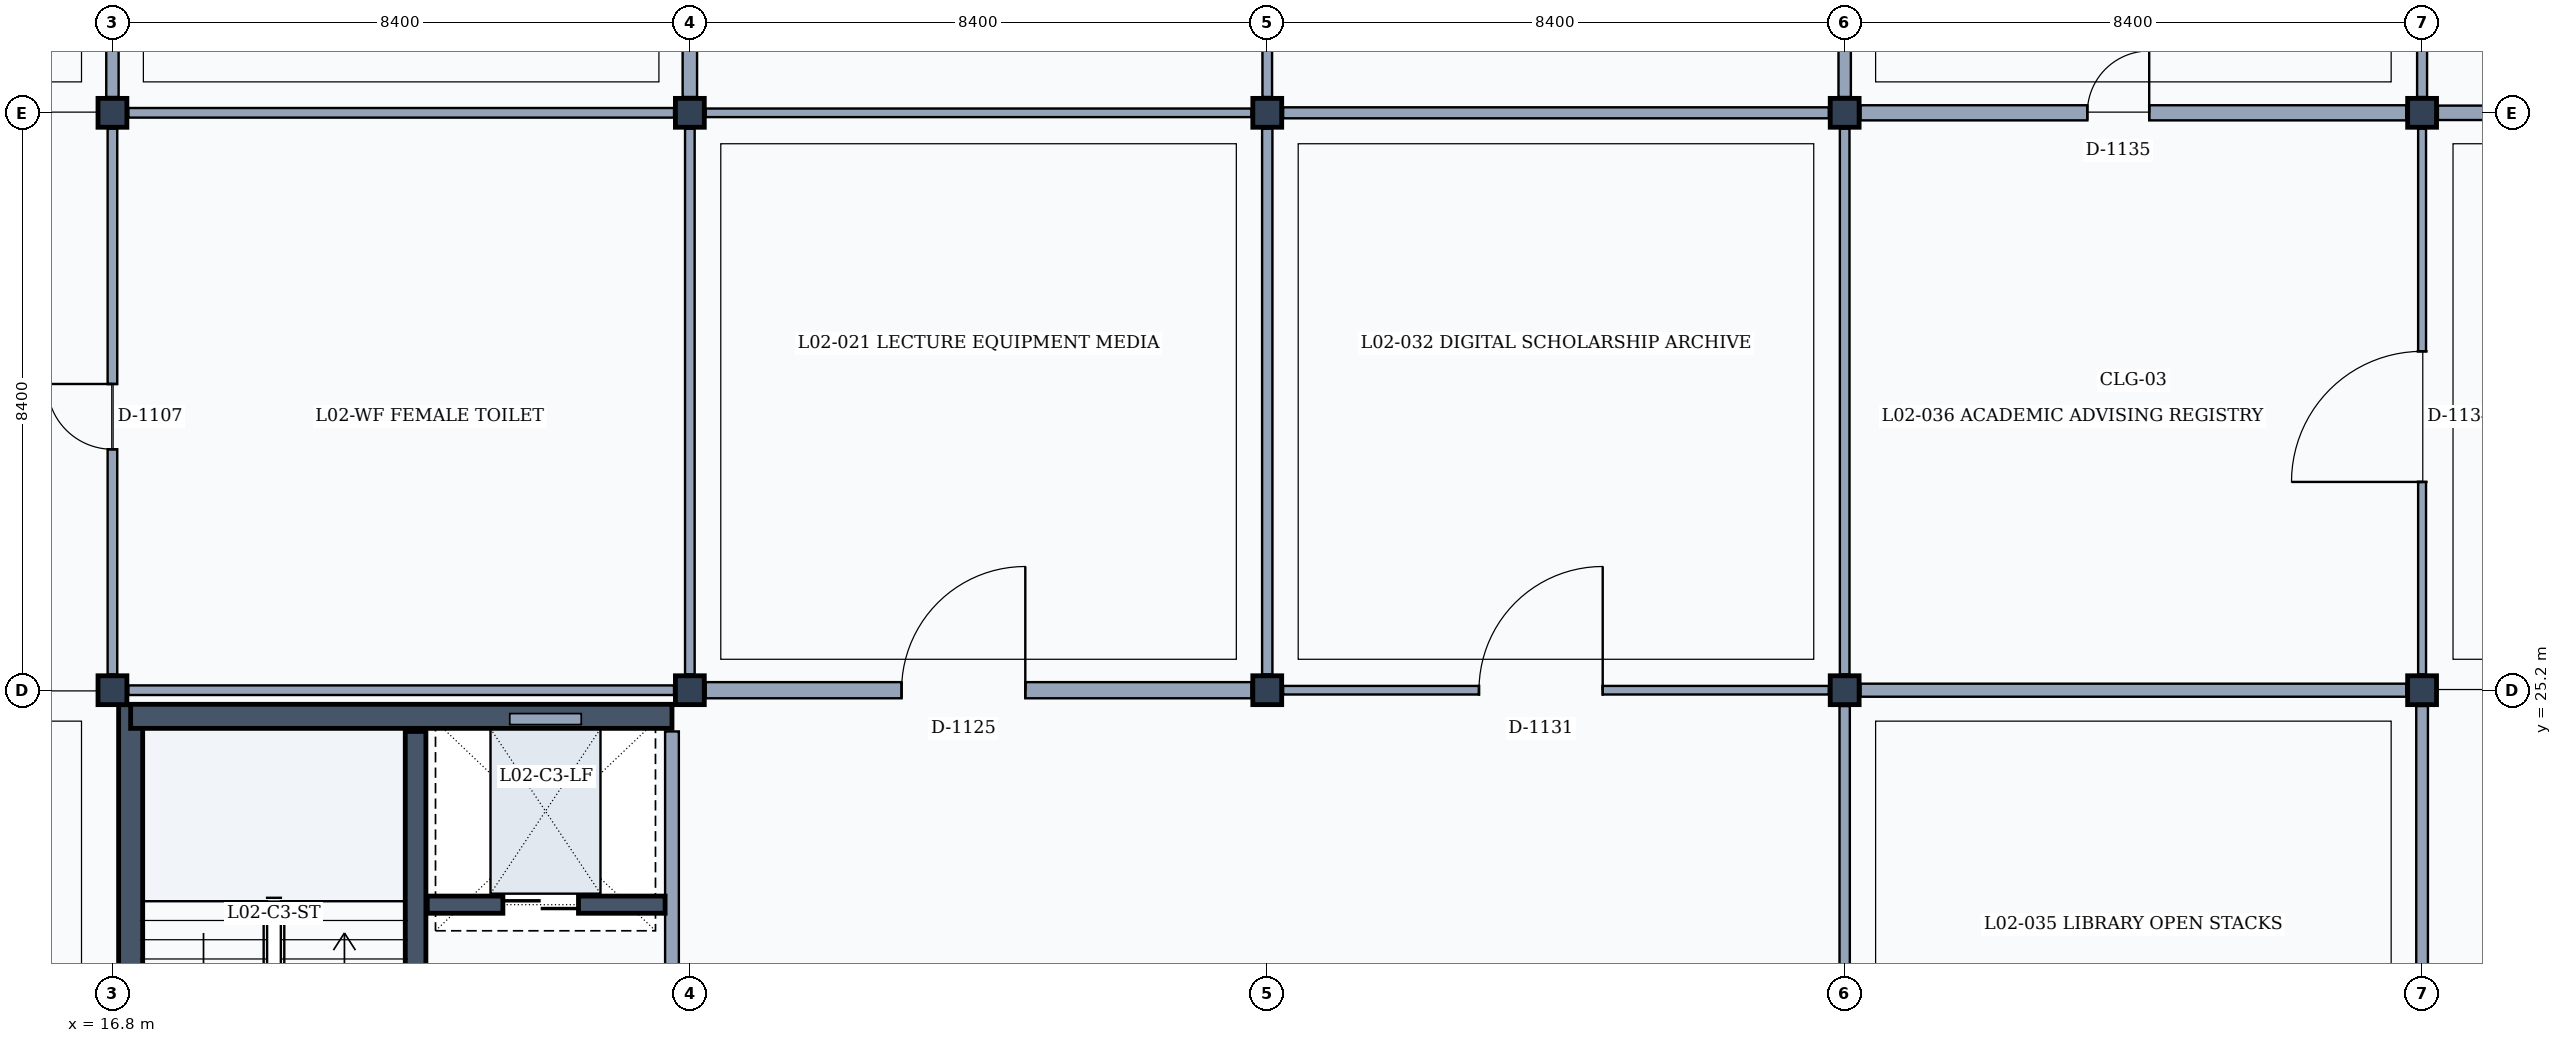
"""IFC4 building model, lengths in metres.
Left out: names, types, materials, properties, quantities, classifications, styles, units other than length and angle.
Written with IfcOpenShell. Run it as: python <this file> out.ifc"""

import sys

from ifc_helpers import new_model, si_unit, direction, frame, frame_2d, origin, origin_2d, place, context, subcontext, project, spatial, rectangle, extrude, element, fill, save


model = new_model("IFC4")
c1 = context("Model", 3, precision=1e-05, world=origin(), true_north=direction((0.0, 1.0)))
c2 = subcontext(c1, "Body", "Model", "MODEL_VIEW")
j1 = project(units=[si_unit("LENGTHUNIT", "METRE"), si_unit("PLANEANGLEUNIT", "RADIAN")], contexts=[c1])
p1 = place(None, origin())
s1 = spatial("IfcSite", under=j1, at=p1, CompositionType="ELEMENT")
p2 = place(p1, origin())
s2 = spatial("IfcBuilding", under=s1, at=p2, CompositionType="ELEMENT")
p3 = place(p2, frame((0.0, 0.0, 9.6)))
s3 = spatial("IfcBuildingStorey", under=s2, at=p3, CompositionType="ELEMENT", Elevation=9.6)
for number, where, z_axis, x_axis in (
    (1, (16.8, 25.2, 0.0), (0.0, 0.0, 1.0), (1.0, 0.0, 0.0)),
    (2, (16.8, 33.6, 0.0), (0.0, 0.0, 1.0), (1.0, 0.0, 0.0)),
    (3, (25.2, 25.2, 0.0), (0.0, 0.0, 1.0), (1.0, 0.0, 0.0)),
    (4, (25.2, 33.6, 0.0), (0.0, 0.0, 1.0), (1.0, 0.0, 0.0)),
    (5, (33.6, 25.2, 0.0), (0.0, 0.0, 1.0), (1.0, 0.0, 0.0)),
    (6, (33.6, 33.6, 0.0), (0.0, 0.0, 1.0), (1.0, 0.0, 0.0)),
    (7, (42.0, 25.2, 0.0), (0.0, 0.0, 1.0), (1.0, 0.0, 0.0)),
    (8, (42.0, 33.6, 0.0), (0.0, 0.0, 1.0), (1.0, 0.0, 0.0)),
    (9, (50.4, 25.2, 0.0), (0.0, 0.0, 1.0), (1.0, 0.0, 0.0)),
    (10, (50.4, 33.6, 0.0), (0.0, 0.0, 1.0), (1.0, 0.0, 0.0)),
):
    element("IfcColumn", number, at=place(p3, frame(where, z_axis=z_axis, x_axis=x_axis)), inside=s3, PredefinedType="COLUMN", context=c2, shape_type="SweptSolid", body=[
        extrude(rectangle(XDim=0.42, YDim=0.42, at=origin_2d()), origin(), (0.0, 0.0, 1.0), 4.2),
    ])
p4 = place(p3, frame((17.065, 17.05, 0.0), z_axis=(0.0, 0.0, 1.0), x_axis=(0.0, 1.0, 0.0)))
e11 = element("IfcWall", 11, at=p4, inside=s3, PredefinedType="SHEAR", context=c2, shape_type="SweptSolid", body=[
    extrude(rectangle(XDim=7.94, YDim=0.35, at=frame_2d((3.97, 0.0))), origin(), (0.0, 0.0, 1.0), 3.93),
])
p5 = place(p3, frame((17.065, 24.82, 0.0), z_axis=(0.0, 0.0, 1.0), x_axis=(1.0, 0.0, 0.0)))
e12 = element("IfcWall", 12, at=p5, inside=s3, PredefinedType="SHEAR", context=c2, shape_type="SweptSolid", body=[
    extrude(rectangle(XDim=7.875, YDim=0.35, at=frame_2d((3.938, 0.0))), origin(), (0.0, 0.0, 1.0), 3.93),
])
p6 = place(p3, frame((24.94, 24.6, 0.0), z_axis=(0.0, 0.0, 1.0), x_axis=(0.0, -1.0, 0.0)))
e13 = element("IfcWall", 13, at=p6, inside=s3, PredefinedType="PARTITIONING", context=c2, shape_type="SweptSolid", body=[
    extrude(rectangle(XDim=7.2, YDim=0.2, at=frame_2d((3.6, 0.0))), origin(), (0.0, 0.0, 1.0), 3.32),
])
p7 = place(p3, frame((21.21, 17.22, 0.0), z_axis=(0.0, 0.0, 1.0), x_axis=(0.0, 1.0, 0.0)))
e14 = element("IfcWall", 14, at=p7, inside=s3, PredefinedType="SHEAR", context=c2, shape_type="SweptSolid", body=[
    extrude(rectangle(XDim=7.38, YDim=0.3, at=frame_2d((3.69, 0.0))), origin(), (0.0, 0.0, 1.0), 3.93),
])
p8 = place(p7, frame((0.28, 0.0, 0.0)))
e15 = element("IfcOpeningElement", 15, at=p8, cuts=e14, PredefinedType="OPENING", context=c2, shape_type="SweptSolid", body=[
    extrude(rectangle(XDim=1.1, YDim=2.15, at=frame_2d((0.55, 1.075))), frame((0.0, 0.16, 0.0), z_axis=(0.0, -1.0, 0.0), x_axis=(1.0, 0.0, 0.0)), (0.0, 0.0, 1.0), 0.32),
])
p9 = place(p3, frame((21.38, 22.08, 0.0), z_axis=(0.0, 0.0, 1.0), x_axis=(1.0, 0.0, 0.0)))
e16 = element("IfcWall", 16, at=p9, inside=s3, PredefinedType="SHEAR", context=c2, shape_type="SweptSolid", body=[
    extrude(rectangle(XDim=3.46, YDim=0.25, at=frame_2d((1.73, 0.0))), origin(), (0.0, 0.0, 1.0), 3.93),
])
p10 = place(p9, frame((1.1, 0.0, 0.0)))
e17 = element("IfcOpeningElement", 17, at=p10, cuts=e16, PredefinedType="OPENING", context=c2, shape_type="SweptSolid", body=[
    extrude(rectangle(XDim=1.1, YDim=2.15, at=frame_2d((0.55, 1.075))), frame((0.0, 0.135, 0.0), z_axis=(0.0, -1.0, 0.0), x_axis=(1.0, 0.0, 0.0)), (0.0, 0.0, 1.0), 0.27),
])
p11 = place(p3, frame((16.8, 25.43, 0.0), z_axis=(0.0, 0.0, 1.0), x_axis=(0.0, 1.0, 0.0)))
e18 = element("IfcWall", 18, at=p11, inside=s3, PredefinedType="PARTITIONING", context=c2, shape_type="SweptSolid", body=[
    extrude(rectangle(XDim=7.94, YDim=0.14, at=frame_2d((3.97, 0.0))), origin(), (0.0, 0.0, 1.0), 3.32),
])
p12 = place(p11, frame((3.275, 0.0, 0.0)))
e19 = element("IfcOpeningElement", 19, at=p12, cuts=e18, PredefinedType="OPENING", context=c2, shape_type="SweptSolid", body=[
    extrude(rectangle(XDim=0.95, YDim=2.15, at=frame_2d((0.475, 1.075))), frame((0.0, 0.08, 0.0), z_axis=(0.0, -1.0, 0.0), x_axis=(1.0, 0.0, 0.0)), (0.0, 0.0, 1.0), 0.16),
])
p13 = place(p3, frame((16.8, 33.83, 0.0), z_axis=(0.0, 0.0, 1.0), x_axis=(0.0, 1.0, 0.0)))
e20 = element("IfcWall", 20, at=p13, inside=s3, PredefinedType="PARTITIONING", context=c2, shape_type="SweptSolid", body=[
    extrude(rectangle(XDim=7.96, YDim=0.18, at=frame_2d((3.98, 0.0))), origin(), (0.0, 0.0, 1.0), 3.32),
])
p14 = place(p13, frame((3.15, 0.0, 0.0)))
e21 = element("IfcOpeningElement", 21, at=p14, cuts=e20, PredefinedType="OPENING", context=c2, shape_type="SweptSolid", body=[
    extrude(rectangle(XDim=1.2, YDim=2.2, at=frame_2d((0.6, 1.1))), frame((0.0, 0.1, 0.0), z_axis=(0.0, -1.0, 0.0), x_axis=(1.0, 0.0, 0.0)), (0.0, 0.0, 1.0), 0.2),
])
p15 = place(p3, frame((17.03, 25.2, 0.0), z_axis=(0.0, 0.0, 1.0), x_axis=(1.0, 0.0, 0.0)))
e22 = element("IfcWall", 22, at=p15, inside=s3, PredefinedType="PARTITIONING", context=c2, shape_type="SweptSolid", body=[
    extrude(rectangle(XDim=7.94, YDim=0.14, at=frame_2d((3.97, 0.0))), origin(), (0.0, 0.0, 1.0), 3.32),
])
p16 = place(p3, frame((25.2, 25.43, 0.0), z_axis=(0.0, 0.0, 1.0), x_axis=(0.0, 1.0, 0.0)))
e23 = element("IfcWall", 23, at=p16, inside=s3, PredefinedType="PARTITIONING", context=c2, shape_type="SweptSolid", body=[
    extrude(rectangle(XDim=7.94, YDim=0.14, at=frame_2d((3.97, 0.0))), origin(), (0.0, 0.0, 1.0), 3.32),
])
p17 = place(p3, frame((17.03, 33.6, 0.0), z_axis=(0.0, 0.0, 1.0), x_axis=(1.0, 0.0, 0.0)))
e24 = element("IfcWall", 24, at=p17, inside=s3, PredefinedType="PARTITIONING", context=c2, shape_type="SweptSolid", body=[
    extrude(rectangle(XDim=7.94, YDim=0.14, at=frame_2d((3.97, 0.0))), origin(), (0.0, 0.0, 1.0), 3.32),
])
p18 = place(p3, frame((25.2, 33.83, 0.0), z_axis=(0.0, 0.0, 1.0), x_axis=(0.0, 1.0, 0.0)))
e25 = element("IfcWall", 25, at=p18, inside=s3, PredefinedType="PARTITIONING", context=c2, shape_type="SweptSolid", body=[
    extrude(rectangle(XDim=7.95, YDim=0.21, at=frame_2d((3.975, 0.0))), origin(), (0.0, 0.0, 1.0), 3.32),
])
p19 = place(p18, frame((3.175, 0.0, 0.0)))
e26 = element("IfcOpeningElement", 26, at=p19, cuts=e25, PredefinedType="OPENING", context=c2, shape_type="SweptSolid", body=[
    extrude(rectangle(XDim=1.15, YDim=2.25, at=frame_2d((0.575, 1.125))), frame((0.0, 0.115, 0.0), z_axis=(0.0, -1.0, 0.0), x_axis=(1.0, 0.0, 0.0)), (0.0, 0.0, 1.0), 0.23),
])
p20 = place(p3, frame((25.43, 25.2, 0.0), z_axis=(0.0, 0.0, 1.0), x_axis=(1.0, 0.0, 0.0)))
e27 = element("IfcWall", 27, at=p20, inside=s3, PredefinedType="PARTITIONING", context=c2, shape_type="SweptSolid", body=[
    extrude(rectangle(XDim=7.94, YDim=0.235, at=frame_2d((3.97, 0.0))), origin(), (0.0, 0.0, 1.0), 3.32),
])
p21 = place(p20, frame((2.85, 0.0, 0.0)))
e28 = element("IfcOpeningElement", 28, at=p21, cuts=e27, PredefinedType="OPENING", context=c2, shape_type="SweptSolid", body=[
    extrude(rectangle(XDim=1.8, YDim=2.3, at=frame_2d((0.9, 1.15))), frame((0.0, 0.127, 0.0), z_axis=(0.0, -1.0, 0.0), x_axis=(1.0, 0.0, 0.0)), (0.0, 0.0, 1.0), 0.255),
])
p22 = place(p3, frame((33.6, 25.43, 0.0), z_axis=(0.0, 0.0, 1.0), x_axis=(0.0, 1.0, 0.0)))
e29 = element("IfcWall", 29, at=p22, inside=s3, PredefinedType="PARTITIONING", context=c2, shape_type="SweptSolid", body=[
    extrude(rectangle(XDim=7.94, YDim=0.15, at=frame_2d((3.97, 0.0))), origin(), (0.0, 0.0, 1.0), 3.32),
])
p23 = place(p3, frame((25.43, 33.6, 0.0), z_axis=(0.0, 0.0, 1.0), x_axis=(1.0, 0.0, 0.0)))
e30 = element("IfcWall", 30, at=p23, inside=s3, PredefinedType="PARTITIONING", context=c2, shape_type="SweptSolid", body=[
    extrude(rectangle(XDim=7.94, YDim=0.125, at=frame_2d((3.97, 0.0))), origin(), (0.0, 0.0, 1.0), 3.32),
])
p24 = place(p3, frame((33.6, 33.83, 0.0), z_axis=(0.0, 0.0, 1.0), x_axis=(0.0, 1.0, 0.0)))
e31 = element("IfcWall", 31, at=p24, inside=s3, PredefinedType="PARTITIONING", context=c2, shape_type="SweptSolid", body=[
    extrude(rectangle(XDim=7.96, YDim=0.14, at=frame_2d((3.98, 0.0))), origin(), (0.0, 0.0, 1.0), 3.32),
])
p25 = place(p24, frame((3.05, 0.0, 0.0)))
e32 = element("IfcOpeningElement", 32, at=p25, cuts=e31, PredefinedType="OPENING", context=c2, shape_type="SweptSolid", body=[
    extrude(rectangle(XDim=1.4, YDim=2.25, at=frame_2d((0.7, 1.125))), frame((0.0, 0.08, 0.0), z_axis=(0.0, -1.0, 0.0), x_axis=(1.0, 0.0, 0.0)), (0.0, 0.0, 1.0), 0.16),
])
p26 = place(p3, frame((42.0, 17.03, 0.0), z_axis=(0.0, 0.0, 1.0), x_axis=(0.0, 1.0, 0.0)))
e33 = element("IfcWall", 33, at=p26, inside=s3, PredefinedType="PARTITIONING", context=c2, shape_type="SweptSolid", body=[
    extrude(rectangle(XDim=7.94, YDim=0.15, at=frame_2d((3.97, 0.0))), origin(), (0.0, 0.0, 1.0), 3.32),
])
p27 = place(p3, frame((33.83, 25.2, 0.0), z_axis=(0.0, 0.0, 1.0), x_axis=(1.0, 0.0, 0.0)))
e34 = element("IfcWall", 34, at=p27, inside=s3, PredefinedType="PARTITIONING", context=c2, shape_type="SweptSolid", body=[
    extrude(rectangle(XDim=7.94, YDim=0.125, at=frame_2d((3.97, 0.0))), origin(), (0.0, 0.0, 1.0), 3.32),
])
p28 = place(p27, frame((2.85, 0.0, 0.0)))
e35 = element("IfcOpeningElement", 35, at=p28, cuts=e34, PredefinedType="OPENING", context=c2, shape_type="SweptSolid", body=[
    extrude(rectangle(XDim=1.8, YDim=2.3, at=frame_2d((0.9, 1.15))), frame((0.0, 0.073, 0.0), z_axis=(0.0, -1.0, 0.0), x_axis=(1.0, 0.0, 0.0)), (0.0, 0.0, 1.0), 0.145),
])
p29 = place(p3, frame((42.0, 25.43, 0.0), z_axis=(0.0, 0.0, 1.0), x_axis=(0.0, 1.0, 0.0)))
e36 = element("IfcWall", 36, at=p29, inside=s3, PredefinedType="PARTITIONING", context=c2, shape_type="SweptSolid", body=[
    extrude(rectangle(XDim=7.94, YDim=0.14, at=frame_2d((3.97, 0.0))), origin(), (0.0, 0.0, 1.0), 3.32),
])
p30 = place(p3, frame((33.83, 33.6, 0.0), z_axis=(0.0, 0.0, 1.0), x_axis=(1.0, 0.0, 0.0)))
e37 = element("IfcWall", 37, at=p30, inside=s3, PredefinedType="PARTITIONING", context=c2, shape_type="SweptSolid", body=[
    extrude(rectangle(XDim=7.94, YDim=0.16, at=frame_2d((3.97, 0.0))), origin(), (0.0, 0.0, 1.0), 3.32),
])
p31 = place(p3, frame((42.0, 33.83, 0.0), z_axis=(0.0, 0.0, 1.0), x_axis=(0.0, 1.0, 0.0)))
e38 = element("IfcWall", 38, at=p31, inside=s3, PredefinedType="PARTITIONING", context=c2, shape_type="SweptSolid", body=[
    extrude(rectangle(XDim=7.95, YDim=0.18, at=frame_2d((3.975, 0.0))), origin(), (0.0, 0.0, 1.0), 3.32),
])
p32 = place(p3, frame((50.4, 17.03, 0.0), z_axis=(0.0, 0.0, 1.0), x_axis=(0.0, 1.0, 0.0)))
e39 = element("IfcWall", 39, at=p32, inside=s3, PredefinedType="PARTITIONING", context=c2, shape_type="SweptSolid", body=[
    extrude(rectangle(XDim=7.94, YDim=0.17, at=frame_2d((3.97, 0.0))), origin(), (0.0, 0.0, 1.0), 3.32),
])
p33 = place(p3, frame((42.23, 25.2, 0.0), z_axis=(0.0, 0.0, 1.0), x_axis=(1.0, 0.0, 0.0)))
e40 = element("IfcWall", 40, at=p33, inside=s3, PredefinedType="PARTITIONING", context=c2, shape_type="SweptSolid", body=[
    extrude(rectangle(XDim=7.94, YDim=0.19, at=frame_2d((3.97, 0.0))), origin(), (0.0, 0.0, 1.0), 3.32),
])
p34 = place(p3, frame((50.4, 25.43, 0.0), z_axis=(0.0, 0.0, 1.0), x_axis=(0.0, 1.0, 0.0)))
e41 = element("IfcWall", 41, at=p34, inside=s3, PredefinedType="PARTITIONING", context=c2, shape_type="SweptSolid", body=[
    extrude(rectangle(XDim=7.94, YDim=0.115, at=frame_2d((3.97, 0.0))), origin(), (0.0, 0.0, 1.0), 3.32),
])
p35 = place(p34, frame((2.8, 0.0, 0.0)))
e42 = element("IfcOpeningElement", 42, at=p35, cuts=e41, PredefinedType="OPENING", context=c2, shape_type="SweptSolid", body=[
    extrude(rectangle(XDim=1.9, YDim=2.4, at=frame_2d((0.95, 1.2))), frame((0.0, 0.067, 0.0), z_axis=(0.0, -1.0, 0.0), x_axis=(1.0, 0.0, 0.0)), (0.0, 0.0, 1.0), 0.135),
])
p36 = place(p3, frame((42.23, 33.6, 0.0), z_axis=(0.0, 0.0, 1.0), x_axis=(1.0, 0.0, 0.0)))
e43 = element("IfcWall", 43, at=p36, inside=s3, PredefinedType="PARTITIONING", context=c2, shape_type="SweptSolid", body=[
    extrude(rectangle(XDim=7.94, YDim=0.22, at=frame_2d((3.97, 0.0))), origin(), (0.0, 0.0, 1.0), 3.32),
])
p37 = place(p36, frame((3.3, 0.0, 0.0)))
e44 = element("IfcOpeningElement", 44, at=p37, cuts=e43, PredefinedType="OPENING", context=c2, shape_type="SweptSolid", body=[
    extrude(rectangle(XDim=0.9, YDim=2.1, at=frame_2d((0.45, 1.05))), frame((0.0, 0.12, 0.0), z_axis=(0.0, -1.0, 0.0), x_axis=(1.0, 0.0, 0.0)), (0.0, 0.0, 1.0), 0.24),
])
p38 = place(p3, frame((50.4, 33.83, 0.0), z_axis=(0.0, 0.0, 1.0), x_axis=(0.0, 1.0, 0.0)))
e45 = element("IfcWall", 45, at=p38, inside=s3, PredefinedType="PARTITIONING", context=c2, shape_type="SweptSolid", body=[
    extrude(rectangle(XDim=7.96, YDim=0.145, at=frame_2d((3.98, 0.0))), origin(), (0.0, 0.0, 1.0), 3.32),
])
p39 = place(p3, frame((50.63, 33.6, 0.0), z_axis=(0.0, 0.0, 1.0), x_axis=(1.0, 0.0, 0.0)))
e46 = element("IfcWall", 46, at=p39, inside=s3, PredefinedType="PARTITIONING", context=c2, shape_type="SweptSolid", body=[
    extrude(rectangle(XDim=7.95, YDim=0.21, at=frame_2d((3.975, 0.0))), origin(), (0.0, 0.0, 1.0), 3.32),
])
p40 = place(p39, frame((3.075, 0.0, 0.0)))
e47 = element("IfcOpeningElement", 47, at=p40, cuts=e46, PredefinedType="OPENING", context=c2, shape_type="SweptSolid", body=[
    extrude(rectangle(XDim=1.35, YDim=2.25, at=frame_2d((0.675, 1.125))), frame((0.0, 0.115, 0.0), z_axis=(0.0, -1.0, 0.0), x_axis=(1.0, 0.0, 0.0)), (0.0, 0.0, 1.0), 0.23),
])
p41 = place(p10, origin())
e48 = element("IfcDoor", 48, at=p41, inside=s3, OperationType="DOUBLE_DOOR_SLIDING", PredefinedType="DOOR", context=c2, shape_type="SweptSolid", body=[
    extrude(rectangle(XDim=1.1, YDim=2.15, at=frame_2d((0.55, 1.075))), frame((0.0, 0.025, 0.0), z_axis=(0.0, -1.0, 0.0), x_axis=(1.0, 0.0, 0.0)), (0.0, 0.0, 1.0), 0.05),
])
fill(e17, e48)
p42 = place(p12, origin())
e49 = element("IfcDoor", 49, at=p42, inside=s3, OperationType="SINGLE_SWING_RIGHT", PredefinedType="DOOR", context=c2, shape_type="SweptSolid", body=[
    extrude(rectangle(XDim=0.95, YDim=2.15, at=frame_2d((0.475, 1.075))), frame((0.0, 0.025, 0.0), z_axis=(0.0, -1.0, 0.0), x_axis=(1.0, 0.0, 0.0)), (0.0, 0.0, 1.0), 0.05),
])
fill(e19, e49)
p43 = place(p21, origin())
e50 = element("IfcDoor", 50, at=p43, inside=s3, OperationType="SINGLE_SWING_RIGHT", PredefinedType="DOOR", context=c2, shape_type="SweptSolid", body=[
    extrude(rectangle(XDim=1.8, YDim=2.3, at=frame_2d((0.9, 1.15))), frame((0.0, 0.025, 0.0), z_axis=(0.0, -1.0, 0.0), x_axis=(1.0, 0.0, 0.0)), (0.0, 0.0, 1.0), 0.05),
])
fill(e28, e50)
p44 = place(p28, origin())
e51 = element("IfcDoor", 51, at=p44, inside=s3, OperationType="SINGLE_SWING_RIGHT", PredefinedType="DOOR", context=c2, shape_type="SweptSolid", body=[
    extrude(rectangle(XDim=1.8, YDim=2.3, at=frame_2d((0.9, 1.15))), frame((0.0, 0.025, 0.0), z_axis=(0.0, -1.0, 0.0), x_axis=(1.0, 0.0, 0.0)), (0.0, 0.0, 1.0), 0.05),
])
fill(e35, e51)
p45 = place(p35, origin())
e52 = element("IfcDoor", 52, at=p45, inside=s3, OperationType="SINGLE_SWING_LEFT", PredefinedType="DOOR", context=c2, shape_type="SweptSolid", body=[
    extrude(rectangle(XDim=1.9, YDim=2.4, at=frame_2d((0.95, 1.2))), frame((0.0, 0.025, 0.0), z_axis=(0.0, -1.0, 0.0), x_axis=(1.0, 0.0, 0.0)), (0.0, 0.0, 1.0), 0.05),
])
fill(e42, e52)
p46 = place(p37, origin())
e53 = element("IfcDoor", 53, at=p46, inside=s3, OperationType="SINGLE_SWING_RIGHT", PredefinedType="DOOR", context=c2, shape_type="SweptSolid", body=[
    extrude(rectangle(XDim=0.9, YDim=2.1, at=frame_2d((0.45, 1.05))), frame((0.0, 0.025, 0.0), z_axis=(0.0, -1.0, 0.0), x_axis=(1.0, 0.0, 0.0)), (0.0, 0.0, 1.0), 0.05),
])
fill(e44, e53)
save(model, sys.argv[1])
